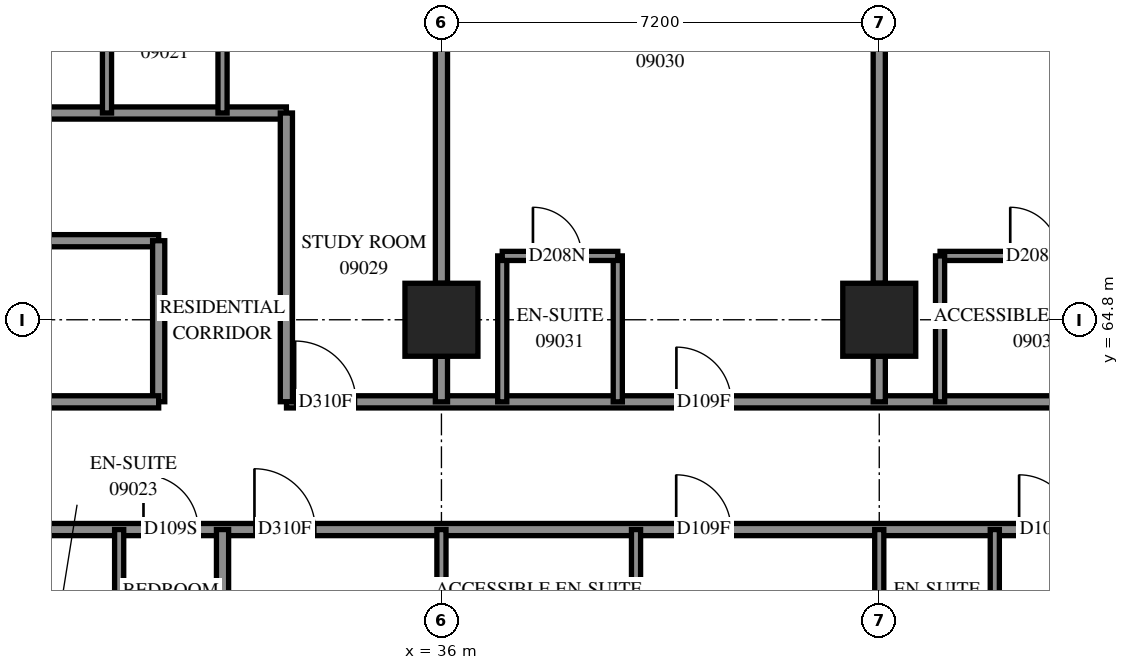
"""IFC4 building model, lengths in metres.
Left out: names, types, materials, properties, quantities, classifications, styles, units other than length and angle.
Written with IfcOpenShell. Run it as: python <this file> out.ifc"""

import sys

from ifc_helpers import new_model, si_unit, direction, frame, frame_2d, origin, origin_2d, place, context, subcontext, project, spatial, rectangle, extrude, element, fill, save


model = new_model("IFC4")
c1 = context("Model", 3, precision=1e-05, world=origin(), true_north=direction((0.0, 1.0)))
c2 = subcontext(c1, "Body", "Model", "MODEL_VIEW")
j1 = project(units=[si_unit("LENGTHUNIT", "METRE"), si_unit("PLANEANGLEUNIT", "RADIAN")], contexts=[c1])
p1 = place(None, origin())
s1 = spatial("IfcSite", under=j1, at=p1, CompositionType="ELEMENT")
p2 = place(p1, origin())
s2 = spatial("IfcBuilding", under=s1, at=p2, CompositionType="ELEMENT")
p3 = place(p2, frame((0.0, 0.0, 37.2)))
s3 = spatial("IfcBuildingStorey", under=s2, at=p3, CompositionType="ELEMENT", Elevation=37.2)
for number, where, z_axis, x_axis in (
    (1, (36.0, 64.8, 0.0), (0.0, 0.0, 1.0), (1.0, 0.0, 0.0)),
    (2, (43.2, 64.8, 0.0), (0.0, 0.0, 1.0), (1.0, 0.0, 0.0)),
):
    element("IfcColumn", number, at=place(p3, frame(where, z_axis=z_axis, x_axis=x_axis)), inside=s3, PredefinedType="COLUMN", context=c2, shape_type="SweptSolid", body=[
        extrude(rectangle(XDim=1.2, YDim=1.2, at=origin_2d()), origin(), (0.0, 0.0, 1.0), 3.1),
    ])
p4 = place(p3, frame((28.8, 61.35, 0.0), z_axis=(0.0, 0.0, 1.0), x_axis=(1.0, 0.0, 0.0)))
e3 = element("IfcWall", 3, at=p4, inside=s3, PredefinedType="PARTITIONING", context=c2, shape_type="SweptSolid", body=[
    extrude(rectangle(XDim=24.15, YDim=0.2, at=frame_2d((12.075, 0.0))), origin(), (0.0, 0.0, 1.0), 3.1),
])
p5 = place(p4, frame((2.3, 0.0, 0.0)))
e4 = element("IfcOpeningElement", 4, at=p5, cuts=e3, PredefinedType="OPENING", context=c2, shape_type="SweptSolid", body=[
    extrude(rectangle(XDim=0.9, YDim=2.1, at=frame_2d((0.45, 1.05))), frame((0.0, 0.11, 0.0), z_axis=(0.0, -1.0, 0.0), x_axis=(1.0, 0.0, 0.0)), (0.0, 0.0, 1.0), 0.22),
])
p6 = place(p4, frame((4.125, 0.0, 0.0)))
e5 = element("IfcOpeningElement", 5, at=p6, cuts=e3, PredefinedType="OPENING", context=c2, shape_type="SweptSolid", body=[
    extrude(rectangle(XDim=1.0, YDim=2.1, at=frame_2d((0.5, 1.05))), frame((0.0, 0.11, 0.0), z_axis=(0.0, -1.0, 0.0), x_axis=(1.0, 0.0, 0.0)), (0.0, 0.0, 1.0), 0.22),
])
p7 = place(p4, frame((11.061, 0.0, 0.0)))
e6 = element("IfcOpeningElement", 6, at=p7, cuts=e3, PredefinedType="OPENING", context=c2, shape_type="SweptSolid", body=[
    extrude(rectangle(XDim=0.9, YDim=2.1, at=frame_2d((0.45, 1.05))), frame((0.0, 0.11, 0.0), z_axis=(0.0, -1.0, 0.0), x_axis=(1.0, 0.0, 0.0)), (0.0, 0.0, 1.0), 0.22),
])
p8 = place(p4, frame((16.7, 0.0, 0.0)))
e7 = element("IfcOpeningElement", 7, at=p8, cuts=e3, PredefinedType="OPENING", context=c2, shape_type="SweptSolid", body=[
    extrude(rectangle(XDim=0.9, YDim=2.1, at=frame_2d((0.45, 1.05))), frame((0.0, 0.11, 0.0), z_axis=(0.0, -1.0, 0.0), x_axis=(1.0, 0.0, 0.0)), (0.0, 0.0, 1.0), 0.22),
])
p9 = place(p4, frame((18.508, 0.0, 0.0)))
e8 = element("IfcOpeningElement", 8, at=p9, cuts=e3, PredefinedType="OPENING", context=c2, shape_type="SweptSolid", body=[
    extrude(rectangle(XDim=1.0, YDim=2.1, at=frame_2d((0.5, 1.05))), frame((0.0, 0.11, 0.0), z_axis=(0.0, -1.0, 0.0), x_axis=(1.0, 0.0, 0.0)), (0.0, 0.0, 1.0), 0.22),
])
p10 = place(p4, frame((22.882, 0.0, 0.0)))
e9 = element("IfcOpeningElement", 9, at=p10, cuts=e3, PredefinedType="OPENING", context=c2, shape_type="SweptSolid", body=[
    extrude(rectangle(XDim=1.0, YDim=2.1, at=frame_2d((0.5, 1.05))), frame((0.0, 0.11, 0.0), z_axis=(0.0, -1.0, 0.0), x_axis=(1.0, 0.0, 0.0)), (0.0, 0.0, 1.0), 0.22),
])
p11 = place(p3, frame((33.452, 63.45, 0.0), z_axis=(0.0, 0.0, 1.0), x_axis=(1.0, 0.0, 0.0)))
e10 = element("IfcWall", 10, at=p11, inside=s3, PredefinedType="PARTITIONING", context=c2, shape_type="SweptSolid", body=[
    extrude(rectangle(XDim=21.648, YDim=0.2, at=frame_2d((10.824, 0.0))), origin(), (0.0, 0.0, 1.0), 3.1),
])
p12 = place(p11, frame((0.142, 0.0, 0.0)))
e11 = element("IfcOpeningElement", 11, at=p12, cuts=e10, PredefinedType="OPENING", context=c2, shape_type="SweptSolid", body=[
    extrude(rectangle(XDim=1.0, YDim=2.1, at=frame_2d((0.5, 1.05))), frame((0.0, 0.11, 0.0), z_axis=(0.0, -1.0, 0.0), x_axis=(1.0, 0.0, 0.0)), (0.0, 0.0, 1.0), 0.22),
])
p13 = place(p11, frame((6.412, 0.0, 0.0)))
e12 = element("IfcOpeningElement", 12, at=p13, cuts=e10, PredefinedType="OPENING", context=c2, shape_type="SweptSolid", body=[
    extrude(rectangle(XDim=0.9, YDim=2.1, at=frame_2d((0.45, 1.05))), frame((0.0, 0.11, 0.0), z_axis=(0.0, -1.0, 0.0), x_axis=(1.0, 0.0, 0.0)), (0.0, 0.0, 1.0), 0.22),
])
p14 = place(p11, frame((14.168, 0.0, 0.0)))
e13 = element("IfcOpeningElement", 13, at=p14, cuts=e10, PredefinedType="OPENING", context=c2, shape_type="SweptSolid", body=[
    extrude(rectangle(XDim=0.9, YDim=2.1, at=frame_2d((0.45, 1.05))), frame((0.0, 0.11, 0.0), z_axis=(0.0, -1.0, 0.0), x_axis=(1.0, 0.0, 0.0)), (0.0, 0.0, 1.0), 0.22),
])
p15 = place(p11, frame((17.651, 0.0, 0.0)))
e14 = element("IfcOpeningElement", 14, at=p15, cuts=e10, PredefinedType="OPENING", context=c2, shape_type="SweptSolid", body=[
    extrude(rectangle(XDim=0.9, YDim=2.1, at=frame_2d((0.45, 1.05))), frame((0.0, 0.11, 0.0), z_axis=(0.0, -1.0, 0.0), x_axis=(1.0, 0.0, 0.0)), (0.0, 0.0, 1.0), 0.22),
])
p16 = place(p3, frame((21.602, 68.2, 0.0), z_axis=(0.0, 0.0, 1.0), x_axis=(1.0, 0.0, 0.0)))
e15 = element("IfcWall", 15, at=p16, inside=s3, PredefinedType="PARTITIONING", context=c2, shape_type="SweptSolid", body=[
    extrude(rectangle(XDim=11.848, YDim=0.2, at=frame_2d((5.924, 0.0))), origin(), (0.0, 0.0, 1.0), 3.1),
])
p17 = place(p16, frame((5.855, 0.0, 0.0)))
e16 = element("IfcOpeningElement", 16, at=p17, cuts=e15, PredefinedType="OPENING", context=c2, shape_type="SweptSolid", body=[
    extrude(rectangle(XDim=0.9, YDim=2.1, at=frame_2d((0.45, 1.05))), frame((0.0, 0.11, 0.0), z_axis=(0.0, -1.0, 0.0), x_axis=(1.0, 0.0, 0.0)), (0.0, 0.0, 1.0), 0.22),
])
p18 = place(p3, frame((21.602, 66.1, 0.0), z_axis=(0.0, 0.0, 1.0), x_axis=(1.0, 0.0, 0.0)))
e17 = element("IfcWall", 17, at=p18, inside=s3, PredefinedType="PARTITIONING", context=c2, shape_type="SweptSolid", body=[
    extrude(rectangle(XDim=9.748, YDim=0.2, at=frame_2d((4.874, 0.0))), origin(), (0.0, 0.0, 1.0), 3.1),
])
p19 = place(p18, frame((1.791, 0.0, 0.0)))
e18 = element("IfcOpeningElement", 18, at=p19, cuts=e17, PredefinedType="OPENING", context=c2, shape_type="SweptSolid", body=[
    extrude(rectangle(XDim=1.0, YDim=2.1, at=frame_2d((0.5, 1.05))), frame((0.0, 0.11, 0.0), z_axis=(0.0, -1.0, 0.0), x_axis=(1.0, 0.0, 0.0)), (0.0, 0.0, 1.0), 0.22),
])
p20 = place(p18, frame((5.3, 0.0, 0.0)))
e19 = element("IfcOpeningElement", 19, at=p20, cuts=e17, PredefinedType="OPENING", context=c2, shape_type="SweptSolid", body=[
    extrude(rectangle(XDim=1.0, YDim=2.1, at=frame_2d((0.5, 1.05))), frame((0.0, 0.11, 0.0), z_axis=(0.0, -1.0, 0.0), x_axis=(1.0, 0.0, 0.0)), (0.0, 0.0, 1.0), 0.22),
])
for number, where, z_axis, x_axis in (
    (20, (36.0, 65.4, 0.0), (0.0, 0.0, 1.0), (0.0, 1.0, 0.0)),
    (21, (43.2, 65.4, 0.0), (0.0, 0.0, 1.0), (0.0, 1.0, 0.0)),
):
    element("IfcWall", number, at=place(p3, frame(where, z_axis=z_axis, x_axis=x_axis)), inside=s3, PredefinedType="PARTITIONING", context=c2, shape_type="SweptSolid", body=[
        extrude(rectangle(XDim=6.0, YDim=0.2, at=frame_2d((3.0, 0.0))), origin(), (0.0, 0.0, 1.0), 3.1),
    ])
p21 = place(p3, frame((33.45, 63.452, 0.0), z_axis=(0.0, 0.0, 1.0), x_axis=(0.0, 1.0, 0.0)))
e22 = element("IfcWall", 22, at=p21, inside=s3, PredefinedType="PARTITIONING", context=c2, shape_type="SweptSolid", body=[
    extrude(rectangle(XDim=4.748, YDim=0.2, at=frame_2d((2.374, 0.0))), origin(), (0.0, 0.0, 1.0), 3.1),
])
p22 = place(p3, frame((32.4, 56.95, 0.0), z_axis=(0.0, 0.0, 1.0), x_axis=(0.0, 1.0, 0.0)))
e23 = element("IfcWall", 23, at=p22, inside=s3, PredefinedType="PARTITIONING", context=c2, shape_type="SweptSolid", body=[
    extrude(rectangle(XDim=4.4, YDim=0.2, at=frame_2d((2.2, 0.0))), origin(), (0.0, 0.0, 1.0), 3.1),
])
p23 = place(p3, frame((44.2, 65.85, 0.0), z_axis=(0.0, 0.0, 1.0), x_axis=(1.0, 0.0, 0.0)))
e24 = element("IfcWall", 24, at=p23, inside=s3, PredefinedType="PARTITIONING", context=c2, shape_type="SweptSolid", body=[
    extrude(rectangle(XDim=3.2, YDim=0.15, at=frame_2d((1.6, 0.0))), origin(), (0.0, 0.0, 1.0), 3.1),
])
p24 = place(p23, frame((1.154, 0.0, 0.0)))
e25 = element("IfcOpeningElement", 25, at=p24, cuts=e24, PredefinedType="OPENING", context=c2, shape_type="SweptSolid", body=[
    extrude(rectangle(XDim=0.8, YDim=2.1, at=frame_2d((0.4, 1.05))), frame((0.0, 0.085, 0.0), z_axis=(0.0, -1.0, 0.0), x_axis=(1.0, 0.0, 0.0)), (0.0, 0.0, 1.0), 0.17),
])
p25 = place(p3, frame((31.35, 63.452, 0.0), z_axis=(0.0, 0.0, 1.0), x_axis=(0.0, 1.0, 0.0)))
e26 = element("IfcWall", 26, at=p25, inside=s3, PredefinedType="PARTITIONING", context=c2, shape_type="SweptSolid", body=[
    extrude(rectangle(XDim=2.648, YDim=0.2, at=frame_2d((1.324, 0.0))), origin(), (0.0, 0.0, 1.0), 3.1),
])
p26 = place(p3, frame((28.802, 63.45, 0.0), z_axis=(0.0, 0.0, 1.0), x_axis=(1.0, 0.0, 0.0)))
e27 = element("IfcWall", 27, at=p26, inside=s3, PredefinedType="PARTITIONING", context=c2, shape_type="SweptSolid", body=[
    extrude(rectangle(XDim=2.548, YDim=0.2, at=frame_2d((1.274, 0.0))), origin(), (0.0, 0.0, 1.0), 3.1),
])
for number, where, z_axis, x_axis in (
    (28, (30.7, 58.95, 0.0), (0.0, 0.0, 1.0), (0.0, 1.0, 0.0)),
    (29, (39.2, 58.95, 0.0), (0.0, 0.0, 1.0), (0.0, 1.0, 0.0)),
    (30, (36.0, 58.95, 0.0), (0.0, 0.0, 1.0), (0.0, 1.0, 0.0)),
    (31, (45.1, 58.95, 0.0), (0.0, 0.0, 1.0), (0.0, 1.0, 0.0)),
    (32, (43.2, 58.95, 0.0), (0.0, 0.0, 1.0), (0.0, 1.0, 0.0)),
    (33, (30.5, 68.2, 0.0), (0.0, 0.0, 1.0), (0.0, 1.0, 0.0)),
    (34, (32.4, 68.2, 0.0), (0.0, 0.0, 1.0), (0.0, 1.0, 0.0)),
    (35, (37.0, 63.45, 0.0), (0.0, 0.0, 1.0), (0.0, 1.0, 0.0)),
    (36, (38.9, 63.45, 0.0), (0.0, 0.0, 1.0), (0.0, 1.0, 0.0)),
    (37, (44.2, 63.45, 0.0), (0.0, 0.0, 1.0), (0.0, 1.0, 0.0)),
):
    element("IfcWall", number, at=place(p3, frame(where, z_axis=z_axis, x_axis=x_axis)), inside=s3, PredefinedType="PARTITIONING", context=c2, shape_type="SweptSolid", body=[
        extrude(rectangle(XDim=2.4, YDim=0.15, at=frame_2d((1.2, 0.0))), origin(), (0.0, 0.0, 1.0), 3.1),
    ])
p27 = place(p3, frame((37.0, 65.85, 0.0), z_axis=(0.0, 0.0, 1.0), x_axis=(1.0, 0.0, 0.0)))
e38 = element("IfcWall", 38, at=p27, inside=s3, PredefinedType="PARTITIONING", context=c2, shape_type="SweptSolid", body=[
    extrude(rectangle(XDim=1.9, YDim=0.15, at=frame_2d((0.95, 0.0))), origin(), (0.0, 0.0, 1.0), 3.1),
])
p28 = place(p27, frame((0.505, 0.0, 0.0)))
e39 = element("IfcOpeningElement", 39, at=p28, cuts=e38, PredefinedType="OPENING", context=c2, shape_type="SweptSolid", body=[
    extrude(rectangle(XDim=0.8, YDim=2.1, at=frame_2d((0.4, 1.05))), frame((0.0, 0.085, 0.0), z_axis=(0.0, -1.0, 0.0), x_axis=(1.0, 0.0, 0.0)), (0.0, 0.0, 1.0), 0.17),
])
for number, where, z_axis, x_axis in (
    (40, (36.0, 63.45, 0.0), (0.0, 0.0, 1.0), (0.0, 1.0, 0.0)),
    (41, (43.2, 63.45, 0.0), (0.0, 0.0, 1.0), (0.0, 1.0, 0.0)),
):
    element("IfcWall", number, at=place(p3, frame(where, z_axis=z_axis, x_axis=x_axis)), inside=s3, PredefinedType="PARTITIONING", context=c2, shape_type="SweptSolid", body=[
        extrude(rectangle(XDim=0.75, YDim=0.2, at=frame_2d((0.375, 0.0))), origin(), (0.0, 0.0, 1.0), 3.1),
    ])
p29 = place(p5, origin())
e42 = element("IfcDoor", 42, at=p29, inside=s3, OperationType="SINGLE_SWING_LEFT", PredefinedType="DOOR", context=c2, shape_type="SweptSolid", body=[
    extrude(rectangle(XDim=0.9, YDim=2.1, at=frame_2d((0.45, 1.05))), frame((0.0, 0.025, 0.0), z_axis=(0.0, -1.0, 0.0), x_axis=(1.0, 0.0, 0.0)), (0.0, 0.0, 1.0), 0.05),
])
fill(e4, e42)
p30 = place(p6, origin())
e43 = element("IfcDoor", 43, at=p30, inside=s3, OperationType="SINGLE_SWING_RIGHT", PredefinedType="DOOR", context=c2, shape_type="SweptSolid", body=[
    extrude(rectangle(XDim=1.0, YDim=2.1, at=frame_2d((0.5, 1.05))), frame((0.0, 0.025, 0.0), z_axis=(0.0, -1.0, 0.0), x_axis=(1.0, 0.0, 0.0)), (0.0, 0.0, 1.0), 0.05),
])
fill(e5, e43)
p31 = place(p7, origin())
e44 = element("IfcDoor", 44, at=p31, inside=s3, OperationType="SINGLE_SWING_LEFT", PredefinedType="DOOR", context=c2, shape_type="SweptSolid", body=[
    extrude(rectangle(XDim=0.9, YDim=2.1, at=frame_2d((0.45, 1.05))), frame((0.0, 0.025, 0.0), z_axis=(0.0, -1.0, 0.0), x_axis=(1.0, 0.0, 0.0)), (0.0, 0.0, 1.0), 0.05),
])
fill(e6, e44)
p32 = place(p8, origin())
e45 = element("IfcDoor", 45, at=p32, inside=s3, OperationType="SINGLE_SWING_LEFT", PredefinedType="DOOR", context=c2, shape_type="SweptSolid", body=[
    extrude(rectangle(XDim=0.9, YDim=2.1, at=frame_2d((0.45, 1.05))), frame((0.0, 0.025, 0.0), z_axis=(0.0, -1.0, 0.0), x_axis=(1.0, 0.0, 0.0)), (0.0, 0.0, 1.0), 0.05),
])
fill(e7, e45)
p33 = place(p12, origin())
e46 = element("IfcDoor", 46, at=p33, inside=s3, OperationType="SINGLE_SWING_LEFT", PredefinedType="DOOR", context=c2, shape_type="SweptSolid", body=[
    extrude(rectangle(XDim=1.0, YDim=2.1, at=frame_2d((0.5, 1.05))), frame((0.0, 0.025, 0.0), z_axis=(0.0, -1.0, 0.0), x_axis=(1.0, 0.0, 0.0)), (0.0, 0.0, 1.0), 0.05),
])
fill(e11, e46)
p34 = place(p13, origin())
e47 = element("IfcDoor", 47, at=p34, inside=s3, OperationType="SINGLE_SWING_RIGHT", PredefinedType="DOOR", context=c2, shape_type="SweptSolid", body=[
    extrude(rectangle(XDim=0.9, YDim=2.1, at=frame_2d((0.45, 1.05))), frame((0.0, 0.025, 0.0), z_axis=(0.0, -1.0, 0.0), x_axis=(1.0, 0.0, 0.0)), (0.0, 0.0, 1.0), 0.05),
])
fill(e12, e47)
p35 = place(p28, origin())
e48 = element("IfcDoor", 48, at=p35, inside=s3, OperationType="SINGLE_SWING_RIGHT", PredefinedType="DOOR", context=c2, shape_type="SweptSolid", body=[
    extrude(rectangle(XDim=0.8, YDim=2.1, at=frame_2d((0.4, 1.05))), frame((0.0, 0.025, 0.0), z_axis=(0.0, -1.0, 0.0), x_axis=(1.0, 0.0, 0.0)), (0.0, 0.0, 1.0), 0.05),
])
fill(e39, e48)
p36 = place(p24, origin())
e49 = element("IfcDoor", 49, at=p36, inside=s3, OperationType="SINGLE_SWING_RIGHT", PredefinedType="DOOR", context=c2, shape_type="SweptSolid", body=[
    extrude(rectangle(XDim=0.8, YDim=2.1, at=frame_2d((0.4, 1.05))), frame((0.0, 0.025, 0.0), z_axis=(0.0, -1.0, 0.0), x_axis=(1.0, 0.0, 0.0)), (0.0, 0.0, 1.0), 0.05),
])
fill(e25, e49)
save(model, sys.argv[1])
